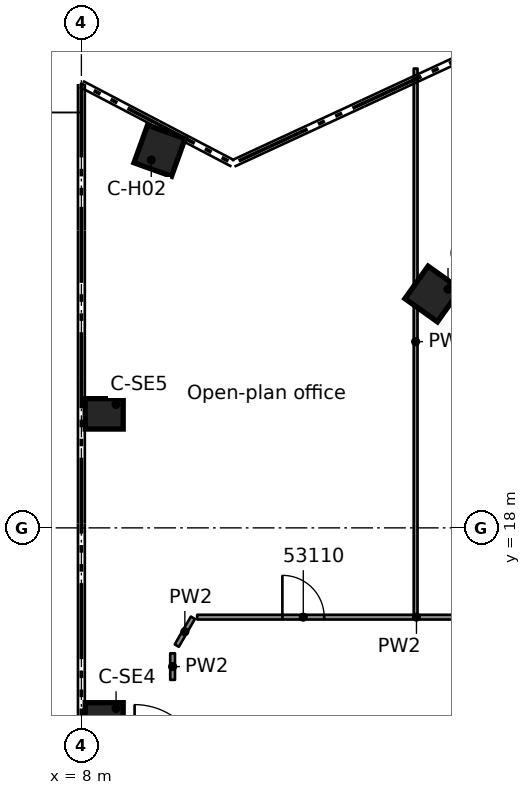
"""IFC4 building model, lengths in metres.
Left out: names, types, materials, properties, quantities, classifications, styles, units other than length and angle.
Written with IfcOpenShell. Run it as: python <this file> out.ifc"""

import sys

from ifc_helpers import new_model, si_unit, direction, frame, frame_2d, origin, origin_2d, place, context, subcontext, project, spatial, rectangle, extrude, element, fill, save


model = new_model("IFC4")
c1 = context("Model", 3, precision=1e-05, world=origin(), true_north=direction((0.0, 1.0)))
c2 = subcontext(c1, "Body", "Model", "MODEL_VIEW")
j1 = project(units=[si_unit("LENGTHUNIT", "METRE"), si_unit("PLANEANGLEUNIT", "RADIAN")], contexts=[c1])
p1 = place(None, origin())
s1 = spatial("IfcSite", under=j1, at=p1, CompositionType="ELEMENT")
p2 = place(p1, origin())
s2 = spatial("IfcBuilding", under=s1, at=p2, CompositionType="ELEMENT")
p3 = place(p2, frame((0.0, 0.0, 267.5)))
s3 = spatial("IfcBuildingStorey", under=s2, at=p3, CompositionType="ELEMENT", Elevation=267.5)
for number, where, z_axis, x_axis in (
    (1, (10.056, 27.923, 0.0), (0.0, 0.0, 1.0), (0.339, 0.941, 0.0)),
    (2, (17.246, 24.154, 0.0), (0.0, 0.0, 1.0), (0.581, 0.814, 0.0)),
):
    element("IfcColumn", number, at=place(p3, frame(where, z_axis=z_axis, x_axis=x_axis)), inside=s3, PredefinedType="COLUMN", context=c2, shape_type="SweptSolid", body=[
        extrude(rectangle(XDim=1.05, YDim=1.05, at=origin_2d()), origin(), (0.0, 0.0, 1.0), 3.5),
    ])
for number, where, z_axis, x_axis in (
    (3, (8.6, 13.0, 0.0), (0.0, 0.0, 1.0), (1.0, 0.0, 0.0)),
    (4, (8.6, 21.0, 0.0), (0.0, 0.0, 1.0), (1.0, 0.0, 0.0)),
):
    element("IfcColumn", number, at=place(p3, frame(where, z_axis=z_axis, x_axis=x_axis)), inside=s3, PredefinedType="COLUMN", context=c2, shape_type="SweptSolid", body=[
        extrude(rectangle(XDim=1.0, YDim=0.8, at=origin_2d()), origin(), (0.0, 0.0, 1.0), 3.5),
    ])
p4 = place(p3, frame((11.047, 15.651, 0.0), z_axis=(0.0, 0.0, 1.0), x_axis=(1.0, 0.0, 0.0)))
e5 = element("IfcWall", 5, at=p4, inside=s3, PredefinedType="PARTITIONING", context=c2, shape_type="SweptSolid", body=[
    extrude(rectangle(XDim=11.54, YDim=0.125, at=frame_2d((5.77, 0.0))), origin(), (0.0, 0.0, 1.0), 3.03),
])
p5 = place(p4, frame((7.848, 0.0, 0.0)))
e6 = element("IfcOpeningElement", 6, at=p5, cuts=e5, PredefinedType="OPENING", context=c2, shape_type="SweptSolid", body=[
    extrude(rectangle(XDim=1.8, YDim=2.1, at=frame_2d((0.9, 1.05))), frame((0.0, 0.073, 0.0), z_axis=(0.0, -1.0, 0.0), x_axis=(1.0, 0.0, 0.0)), (0.0, 0.0, 1.0), 0.145),
])
p6 = place(p4, frame((2.242, 0.0, 0.0)))
e7 = element("IfcOpeningElement", 7, at=p6, cuts=e5, PredefinedType="OPENING", context=c2, shape_type="SweptSolid", body=[
    extrude(rectangle(XDim=1.1, YDim=2.1, at=frame_2d((0.55, 1.05))), frame((0.0, 0.073, 0.0), z_axis=(0.0, -1.0, 0.0), x_axis=(1.0, 0.0, 0.0)), (0.0, 0.0, 1.0), 0.145),
])
p7 = place(p3, frame((10.51, 14.902, 0.0), z_axis=(0.0, 0.0, 1.0), x_axis=(0.500820310379, 0.865551279077, 0.0)))
e8 = element("IfcWall", 8, at=p7, inside=s3, PredefinedType="PARTITIONING", context=c2, shape_type="SweptSolid", body=[
    extrude(rectangle(XDim=0.847, YDim=0.125, at=frame_2d((0.423, 0.0))), origin(), (0.0, 0.0, 1.0), 3.03),
])
p8 = place(p3, frame((16.795, 15.713, 0.0), z_axis=(0.0, 0.0, 1.0), x_axis=(0.0, 1.0, 0.0)))
e9 = element("IfcWall", 9, at=p8, inside=s3, PredefinedType="PARTITIONING", context=c2, shape_type="SweptSolid", body=[
    extrude(rectangle(XDim=14.373, YDim=0.1, at=frame_2d((7.187, 0.0))), origin(), (0.0, 0.0, 1.0), 3.03),
])
p9 = place(p3, frame((10.4, 14.0, 0.0), z_axis=(0.0, 0.0, 1.0), x_axis=(0.0, 1.0, 0.0)))
e10 = element("IfcWall", 10, at=p9, inside=s3, PredefinedType="PARTITIONING", context=c2, shape_type="SweptSolid", body=[
    extrude(rectangle(XDim=0.7, YDim=0.125, at=frame_2d((0.35, 0.0))), origin(), (0.0, 0.0, 1.0), 3.03),
])
p10 = place(p6, origin())
e11 = element("IfcDoor", 11, at=p10, inside=s3, OperationType="SINGLE_SWING_LEFT", PredefinedType="DOOR", context=c2, shape_type="SweptSolid", body=[
    extrude(rectangle(XDim=1.1, YDim=2.1, at=frame_2d((0.55, 1.05))), frame((0.0, 0.025, 0.0), z_axis=(0.0, -1.0, 0.0), x_axis=(1.0, 0.0, 0.0)), (0.0, 0.0, 1.0), 0.05),
])
fill(e7, e11)
save(model, sys.argv[1])
